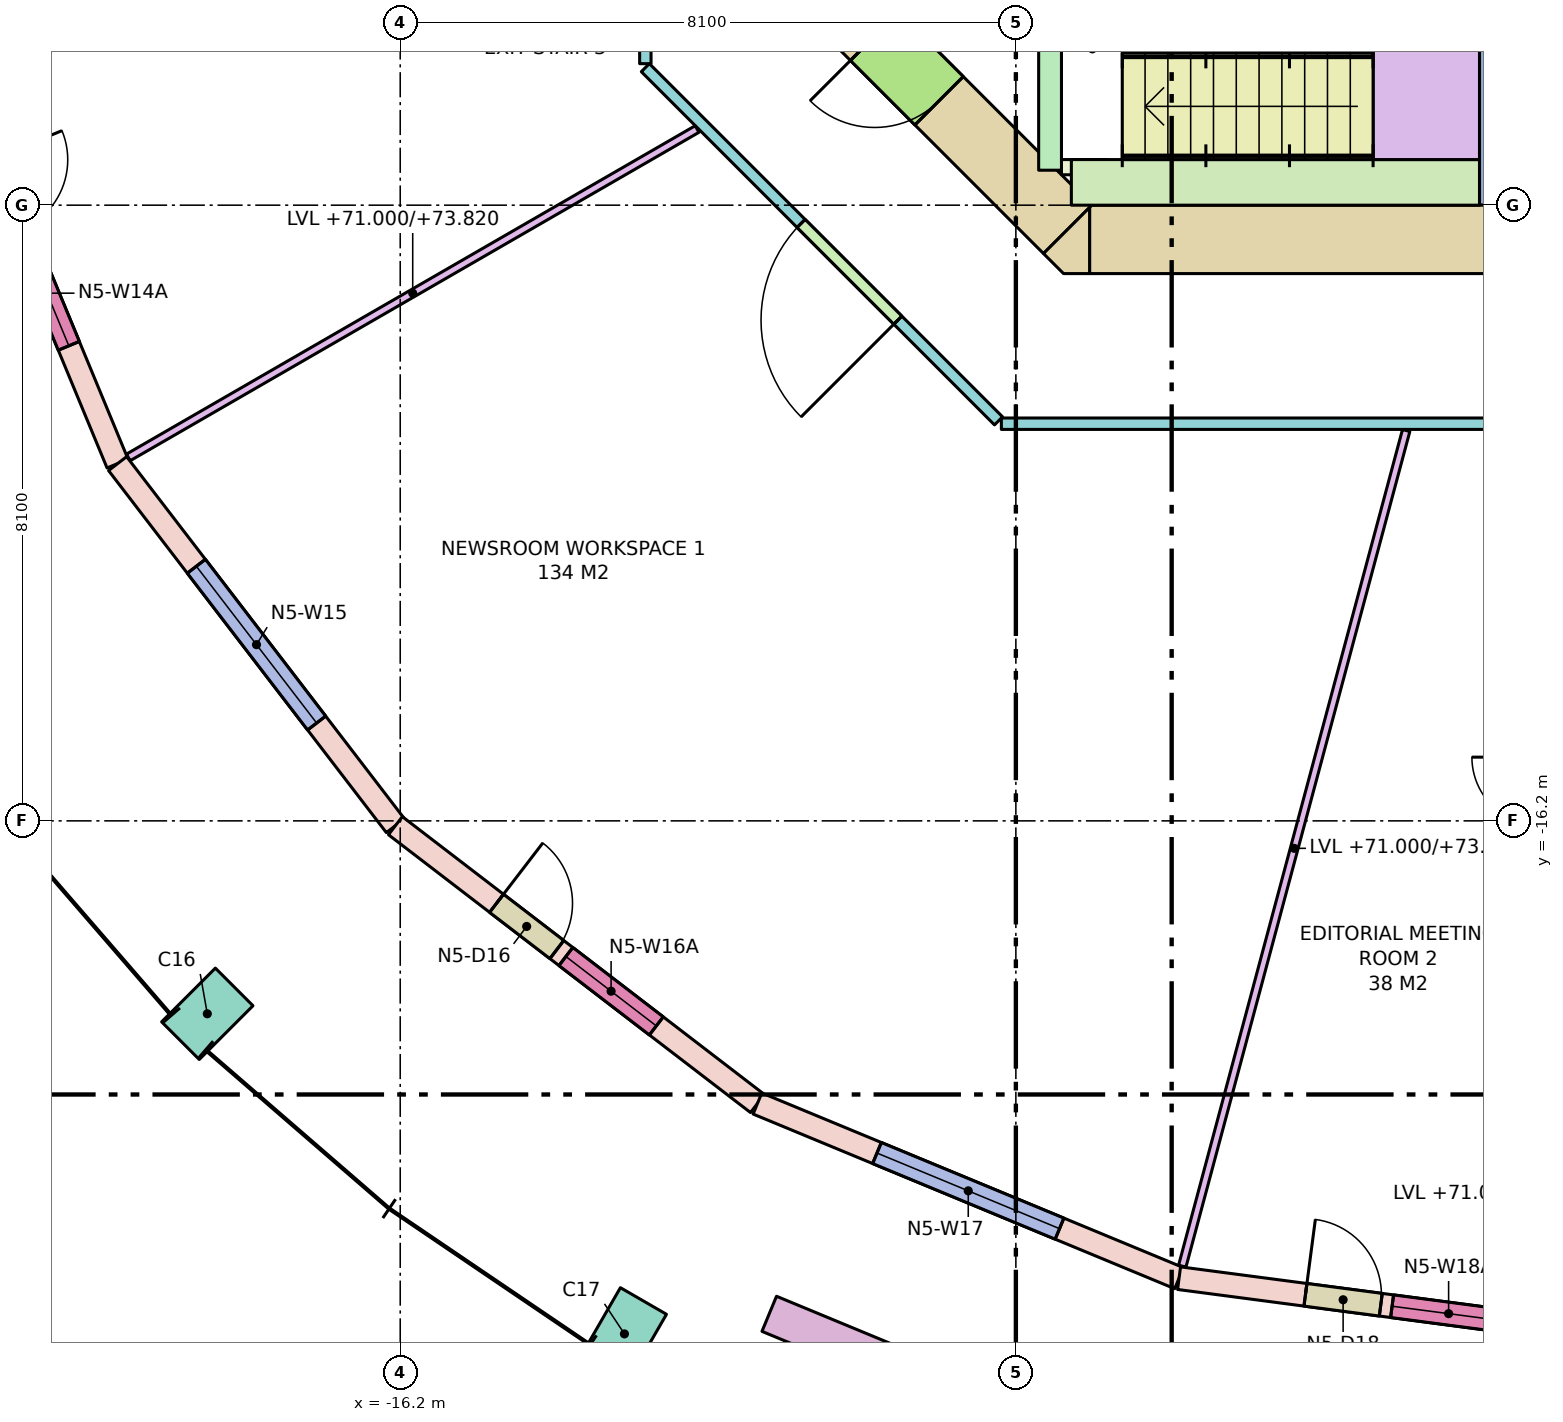
"""IFC4 building model, lengths in metres.
Left out: names, types, materials, properties, quantities, classifications, styles, units other than length and angle.
Written with IfcOpenShell. Run it as: python <this file> out.ifc"""

import sys

from ifc_helpers import new_model, si_unit, direction, frame, frame_2d, origin, origin_2d, place, context, subcontext, project, spatial, polyline, rectangle, outline, extrude, element, fill, save


model = new_model("IFC4")
c1 = context("Model", 3, precision=1e-05, world=origin(), true_north=direction((0.0, 1.0)))
c2 = subcontext(c1, "Body", "Model", "MODEL_VIEW")
j1 = project(units=[si_unit("LENGTHUNIT", "METRE"), si_unit("PLANEANGLEUNIT", "RADIAN")], contexts=[c1])
p1 = place(None, origin())
s1 = spatial("IfcSite", under=j1, at=p1, CompositionType="ELEMENT")
p2 = place(p1, origin())
s2 = spatial("IfcBuilding", under=s1, at=p2, CompositionType="ELEMENT")
p3 = place(p2, frame((0.0, 0.0, 71.0)))
s3 = spatial("IfcBuildingStorey", under=s2, at=p3, CompositionType="ELEMENT", Elevation=71.0)
for number, where, z_axis, x_axis in (
    (1, (-18.738, -18.738, 0.0), (0.0, 0.0, 1.0), (0.707, -0.707, 0.0)),
    (2, (-13.25, -22.95, 0.0), (0.0, 0.0, 1.0), (0.866, -0.5, 0.0)),
):
    element("IfcColumn", number, at=place(p3, frame(where, z_axis=z_axis, x_axis=x_axis)), inside=s3, PredefinedType="COLUMN", context=c2, shape_type="SweptSolid", body=[
        extrude(rectangle(XDim=0.7, YDim=1.0, at=origin_2d()), origin(), (0.0, 0.0, 1.0), 4.0),
    ])
p4 = place(p3, frame((-7.13, -8.55, -0.28), z_axis=(0.0, 0.0, 1.0), x_axis=(1.0, 0.0, 0.0)))
e3 = element("IfcWall", 3, at=p4, inside=s3, PredefinedType="SHEAR", context=c2, shape_type="SweptSolid", body=[
    extrude(rectangle(XDim=14.26, YDim=0.9, at=frame_2d((7.13, 0.0))), origin(), (0.0, 0.0, 1.0), 4.0),
])
p5 = place(p4, frame((8.08, 0.0, 0.28)))
e4 = element("IfcOpeningElement", 4, at=p5, cuts=e3, PredefinedType="OPENING", context=c2, shape_type="SweptSolid", body=[
    extrude(rectangle(XDim=0.7, YDim=2.1, at=frame_2d((0.35, 1.05))), frame((0.0, 0.46, 0.0), z_axis=(0.0, -1.0, 0.0), x_axis=(1.0, 0.0, 0.0)), (0.0, 0.0, 1.0), 0.92),
])
p6 = place(p4, frame((5.58, 0.0, 0.28)))
e5 = element("IfcOpeningElement", 5, at=p6, cuts=e3, PredefinedType="OPENING", context=c2, shape_type="SweptSolid", body=[
    extrude(rectangle(XDim=0.85, YDim=2.1, at=frame_2d((0.425, 1.05))), frame((0.0, 0.46, 0.0), z_axis=(0.0, -1.0, 0.0), x_axis=(1.0, 0.0, 0.0)), (0.0, 0.0, 1.0), 0.92),
])
p7 = place(p4, frame((6.88, 0.0, 0.28)))
e6 = element("IfcOpeningElement", 6, at=p7, cuts=e3, PredefinedType="OPENING", context=c2, shape_type="SweptSolid", body=[
    extrude(rectangle(XDim=0.85, YDim=2.1, at=frame_2d((0.425, 1.05))), frame((0.0, 0.46, 0.0), z_axis=(0.0, -1.0, 0.0), x_axis=(1.0, 0.0, 0.0)), (0.0, 0.0, 1.0), 0.92),
])
p8 = place(p4, frame((9.967, 0.0, 0.28)))
e7 = element("IfcOpeningElement", 7, at=p8, cuts=e3, PredefinedType="OPENING", context=c2, shape_type="SweptSolid", body=[
    extrude(rectangle(XDim=0.9, YDim=2.1, at=frame_2d((0.45, 1.05))), frame((0.0, 0.46, 0.0), z_axis=(0.0, -1.0, 0.0), x_axis=(1.0, 0.0, 0.0)), (0.0, 0.0, 1.0), 0.92),
])
p9 = place(p4, frame((12.567, 0.0, 0.28)))
e8 = element("IfcOpeningElement", 8, at=p9, cuts=e3, PredefinedType="OPENING", context=c2, shape_type="SweptSolid", body=[
    extrude(rectangle(XDim=0.9, YDim=2.1, at=frame_2d((0.45, 1.05))), frame((0.0, 0.46, 0.0), z_axis=(0.0, -1.0, 0.0), x_axis=(1.0, 0.0, 0.0)), (0.0, 0.0, 1.0), 0.92),
])
p10 = place(p3, frame((-7.418, -8.418, -0.28), z_axis=(0.0, 0.0, 1.0), x_axis=(-0.707106781187, 0.707106781187, 0.0)))
e9 = element("IfcWall", 9, at=p10, inside=s3, PredefinedType="SHEAR", context=c2, shape_type="SweptSolid", body=[
    extrude(rectangle(XDim=4.243, YDim=0.9, at=frame_2d((2.121, 0.0))), origin(), (0.0, 0.0, 1.0), 4.0),
])
p11 = place(p10, frame((2.393, 0.0, 0.28)))
e10 = element("IfcOpeningElement", 10, at=p11, cuts=e9, PredefinedType="OPENING", context=c2, shape_type="SweptSolid", body=[
    extrude(rectangle(XDim=1.2, YDim=2.1, at=frame_2d((0.6, 1.05))), frame((0.0, 0.46, 0.0), z_axis=(0.0, -1.0, 0.0), x_axis=(1.0, 0.0, 0.0)), (0.0, 0.0, 1.0), 0.92),
])
p12 = place(p3, frame((0.0, 0.0, -0.28)))
e11 = element("IfcWall", 11, at=p12, inside=s3, PredefinedType="SHEAR", context=c2, shape_type="SweptSolid", body=[
    extrude(outline(polyline([(-7.473, -9.0), (-7.736, -8.736), (-7.13, -8.13), (-7.13, -9.0), (-7.473, -9.0)])), origin(), (0.0, 0.0, 1.0), 4.0),
])
p13 = place(p3, frame((-1.85, -8.1, 0.0), z_axis=(0.0, 0.0, 1.0), x_axis=(0.0, 1.0, 0.0)))
e12 = element("IfcWall", 12, at=p13, inside=s3, PredefinedType="SHEAR", context=c2, shape_type="SweptSolid", body=[
    extrude(rectangle(XDim=6.6, YDim=0.3, at=frame_2d((3.3, 0.0))), origin(), (0.0, 0.0, 1.0), 3.72),
])
p14 = place(p3, frame((-7.65, -7.64, 0.0), z_axis=(0.0, 0.0, 1.0), x_axis=(0.0, 1.0, 0.0)))
e13 = element("IfcWall", 13, at=p14, inside=s3, PredefinedType="SHEAR", context=c2, shape_type="SweptSolid", body=[
    extrude(rectangle(XDim=3.14, YDim=0.3, at=frame_2d((1.57, 0.0))), origin(), (0.0, 0.0, 1.0), 3.72),
])
p15 = place(p14, frame((1.68, 0.0, 0.0)))
e14 = element("IfcOpeningElement", 14, at=p15, cuts=e13, PredefinedType="OPENING", context=c2, shape_type="SweptSolid", body=[
    extrude(rectangle(XDim=1.32, YDim=2.1, at=frame_2d((0.66, 1.05))), frame((0.0, 0.16, 0.0), z_axis=(0.0, -1.0, 0.0), x_axis=(1.0, 0.0, 0.0)), (0.0, 0.0, 1.0), 0.32),
])
p16 = place(p3, frame((-7.5, -7.6, 0.0), z_axis=(0.0, 0.0, 1.0), x_axis=(1.0, 0.0, 0.0)))
e15 = element("IfcWall", 15, at=p16, inside=s3, PredefinedType="SHEAR", context=c2, shape_type="SweptSolid", body=[
    extrude(rectangle(XDim=0.6, YDim=0.2, at=frame_2d((0.3, 0.0))), origin(), (0.0, 0.0, 1.0), 3.72),
])
p17 = place(p3, frame((-7.37, -7.8, 0.0), z_axis=(0.0, 0.0, 1.0), x_axis=(1.0, 0.0, 0.0)))
e16 = element("IfcWall", 16, at=p17, inside=s3, PredefinedType="SHEAR", context=c2, shape_type="SweptSolid", body=[
    extrude(rectangle(XDim=5.37, YDim=0.6, at=frame_2d((2.685, 0.0))), origin(), (0.0, 0.0, 1.0), 3.72),
])
p18 = place(p3, frame((-22.216, -5.953, 0.0), z_axis=(0.0, 0.0, 1.0), x_axis=(0.382671411433, -0.923884511653, 0.0)))
e17 = element("IfcWall", 17, at=p18, inside=s3, PredefinedType="STANDARD", context=c2, shape_type="SweptSolid", body=[
    extrude(rectangle(XDim=6.004, YDim=0.3, at=frame_2d((3.002, 0.0))), origin(), (0.0, 0.0, 1.0), 3.72),
])
p19 = place(p18, frame((1.677, 0.0, 0.0)))
e18 = element("IfcOpeningElement", 18, at=p19, cuts=e17, PredefinedType="OPENING", context=c2, shape_type="SweptSolid", body=[
    extrude(rectangle(XDim=1.0, YDim=2.4, at=frame_2d((0.5, 1.2))), frame((0.0, 0.16, 0.0), z_axis=(0.0, -1.0, 0.0), x_axis=(1.0, 0.0, 0.0)), (0.0, 0.0, 1.0), 0.32),
])
p20 = place(p18, frame((2.827, 0.0, 0.8)))
e19 = element("IfcOpeningElement", 19, at=p20, cuts=e17, PredefinedType="OPENING", context=c2, shape_type="SweptSolid", body=[
    extrude(rectangle(XDim=1.5, YDim=2.7, at=frame_2d((0.75, 1.35))), frame((0.0, 0.16, 0.0), z_axis=(0.0, -1.0, 0.0), x_axis=(1.0, 0.0, 0.0)), (0.0, 0.0, 1.0), 0.32),
])
p21 = place(p3, frame((-19.919, -11.5, 0.0), z_axis=(0.0, 0.0, 1.0), x_axis=(0.608778912074, -0.793339924758, 0.0)))
e20 = element("IfcWall", 20, at=p21, inside=s3, PredefinedType="STANDARD", context=c2, shape_type="SweptSolid", body=[
    extrude(rectangle(XDim=6.004, YDim=0.3, at=frame_2d((3.002, 0.0))), origin(), (0.0, 0.0, 1.0), 3.72),
])
p22 = place(p21, frame((1.702, 0.0, 0.8)))
e21 = element("IfcOpeningElement", 21, at=p22, cuts=e20, PredefinedType="OPENING", context=c2, shape_type="SweptSolid", body=[
    extrude(rectangle(XDim=2.6, YDim=2.7, at=frame_2d((1.3, 1.35))), frame((0.0, 0.16, 0.0), z_axis=(0.0, -1.0, 0.0), x_axis=(1.0, 0.0, 0.0)), (0.0, 0.0, 1.0), 0.32),
])
p23 = place(p3, frame((-16.263, -16.263, 0.0), z_axis=(0.0, 0.0, 1.0), x_axis=(0.793339924758, -0.608778912074, 0.0)))
e22 = element("IfcWall", 22, at=p23, inside=s3, PredefinedType="STANDARD", context=c2, shape_type="SweptSolid", body=[
    extrude(rectangle(XDim=6.004, YDim=0.3, at=frame_2d((3.002, 0.0))), origin(), (0.0, 0.0, 1.0), 3.72),
])
p24 = place(p23, frame((1.677, 0.0, 0.0)))
e23 = element("IfcOpeningElement", 23, at=p24, cuts=e22, PredefinedType="OPENING", context=c2, shape_type="SweptSolid", body=[
    extrude(rectangle(XDim=1.0, YDim=2.4, at=frame_2d((0.5, 1.2))), frame((0.0, 0.16, 0.0), z_axis=(0.0, -1.0, 0.0), x_axis=(1.0, 0.0, 0.0)), (0.0, 0.0, 1.0), 0.32),
])
p25 = place(p23, frame((2.827, 0.0, 0.8)))
e24 = element("IfcOpeningElement", 24, at=p25, cuts=e22, PredefinedType="OPENING", context=c2, shape_type="SweptSolid", body=[
    extrude(rectangle(XDim=1.5, YDim=2.7, at=frame_2d((0.75, 1.35))), frame((0.0, 0.16, 0.0), z_axis=(0.0, -1.0, 0.0), x_axis=(1.0, 0.0, 0.0)), (0.0, 0.0, 1.0), 0.32),
])
p26 = place(p3, frame((-11.5, -19.919, 0.0), z_axis=(0.0, 0.0, 1.0), x_axis=(0.923884511653, -0.382671411433, 0.0)))
e25 = element("IfcWall", 25, at=p26, inside=s3, PredefinedType="STANDARD", context=c2, shape_type="SweptSolid", body=[
    extrude(rectangle(XDim=6.004, YDim=0.3, at=frame_2d((3.002, 0.0))), origin(), (0.0, 0.0, 1.0), 3.72),
])
p27 = place(p26, frame((1.702, 0.0, 0.8)))
e26 = element("IfcOpeningElement", 26, at=p27, cuts=e25, PredefinedType="OPENING", context=c2, shape_type="SweptSolid", body=[
    extrude(rectangle(XDim=2.6, YDim=2.7, at=frame_2d((1.3, 1.35))), frame((0.0, 0.16, 0.0), z_axis=(0.0, -1.0, 0.0), x_axis=(1.0, 0.0, 0.0)), (0.0, 0.0, 1.0), 0.32),
])
p28 = place(p3, frame((-5.953, -22.216, 0.0), z_axis=(0.0, 0.0, 1.0), x_axis=(0.991445297315, -0.130522880875, 0.0)))
e27 = element("IfcWall", 27, at=p28, inside=s3, PredefinedType="STANDARD", context=c2, shape_type="SweptSolid", body=[
    extrude(rectangle(XDim=6.004, YDim=0.3, at=frame_2d((3.002, 0.0))), origin(), (0.0, 0.0, 1.0), 3.72),
])
p29 = place(p28, frame((1.677, 0.0, 0.0)))
e28 = element("IfcOpeningElement", 28, at=p29, cuts=e27, PredefinedType="OPENING", context=c2, shape_type="SweptSolid", body=[
    extrude(rectangle(XDim=1.0, YDim=2.4, at=frame_2d((0.5, 1.2))), frame((0.0, 0.16, 0.0), z_axis=(0.0, -1.0, 0.0), x_axis=(1.0, 0.0, 0.0)), (0.0, 0.0, 1.0), 0.32),
])
p30 = place(p28, frame((2.827, 0.0, 0.8)))
e29 = element("IfcOpeningElement", 29, at=p30, cuts=e27, PredefinedType="OPENING", context=c2, shape_type="SweptSolid", body=[
    extrude(rectangle(XDim=1.5, YDim=2.7, at=frame_2d((0.75, 1.35))), frame((0.0, 0.16, 0.0), z_axis=(0.0, -1.0, 0.0), x_axis=(1.0, 0.0, 0.0)), (0.0, 0.0, 1.0), 0.32),
])
p31 = place(p3, frame((-11.345, -22.685, 0.0), z_axis=(0.0, 0.0, 1.0), x_axis=(0.923885420167, -0.382669217998, 0.0)))
e30 = element("IfcWall", 30, at=p31, inside=s3, PredefinedType="PARAPET", context=c2, shape_type="SweptSolid", body=[
    extrude(rectangle(XDim=3.6, YDim=0.5, at=frame_2d((1.8, 0.0))), origin(), (0.0, 0.0, 1.0), 0.9),
])
p32 = place(p3, frame((-8.328, -10.938, 0.0), z_axis=(0.0, 0.0, 1.0), x_axis=(-0.707125355289, 0.707088206597, 0.0)))
e31 = element("IfcWall", 31, at=p32, inside=s3, PredefinedType="PARTITIONING", context=c2, shape_type="SweptSolid", body=[
    extrude(rectangle(XDim=6.572, YDim=0.15, at=frame_2d((3.286, 0.0))), origin(), (0.0, 0.0, 1.0), 2.82),
])
p33 = place(p32, frame((1.874, 0.0, 0.0)))
e32 = element("IfcOpeningElement", 32, at=p33, cuts=e31, PredefinedType="OPENING", context=c2, shape_type="SweptSolid", body=[
    extrude(rectangle(XDim=1.8, YDim=2.1, at=frame_2d((0.9, 1.05))), frame((0.0, 0.085, 0.0), z_axis=(0.0, -1.0, 0.0), x_axis=(1.0, 0.0, 0.0)), (0.0, 0.0, 1.0), 0.17),
])
p34 = place(p3, frame((-12.975, -6.238, 0.0), z_axis=(0.0, 0.0, 1.0), x_axis=(0.0, 1.0, 0.0)))
e33 = element("IfcWall", 33, at=p34, inside=s3, PredefinedType="PARTITIONING", context=c2, shape_type="SweptSolid", body=[
    extrude(rectangle(XDim=4.963, YDim=0.15, at=frame_2d((2.482, 0.0))), origin(), (0.0, 0.0, 1.0), 2.82),
])
p35 = place(p3, frame((-1.275, -10.975, 0.0), z_axis=(0.0, 0.0, 1.0), x_axis=(-1.0, 0.0, 0.0)))
e34 = element("IfcWall", 34, at=p35, inside=s3, PredefinedType="PARTITIONING", context=c2, shape_type="SweptSolid", body=[
    extrude(rectangle(XDim=7.016, YDim=0.15, at=frame_2d((3.508, 0.0))), origin(), (0.0, 0.0, 1.0), 2.82),
])
p36 = place(p3, frame((-12.294, -7.098, 0.0), z_axis=(0.0, 0.0, 1.0), x_axis=(-0.866010547425, -0.500025731086, 0.0)))
e35 = element("IfcWall", 35, at=p36, inside=s3, PredefinedType="PARTITIONING", context=c2, shape_type="SweptSolid", body=[
    extrude(rectangle(XDim=8.641, YDim=0.1, at=frame_2d((4.32, 0.0))), origin(), (0.0, 0.0, 1.0), 2.82),
])
p37 = place(p3, frame((-2.965, -11.064, 0.0), z_axis=(0.0, 0.0, 1.0), x_axis=(-0.258827930947, -0.965923445291, 0.0)))
e36 = element("IfcWall", 36, at=p37, inside=s3, PredefinedType="PARTITIONING", context=c2, shape_type="SweptSolid", body=[
    extrude(rectangle(XDim=11.382, YDim=0.1, at=frame_2d((5.691, 0.0))), origin(), (0.0, 0.0, 1.0), 2.82),
])
p38 = place(p20, origin())
e37 = element("IfcWindow", 37, at=p38, inside=s3, PartitioningType="SINGLE_PANEL", PredefinedType="WINDOW", context=c2, shape_type="SweptSolid", body=[
    extrude(rectangle(XDim=1.5, YDim=2.7, at=frame_2d((0.75, 1.35))), frame((0.0, 0.03, 0.0), z_axis=(0.0, -1.0, 0.0), x_axis=(1.0, 0.0, 0.0)), (0.0, 0.0, 1.0), 0.06),
])
fill(e19, e37)
p39 = place(p22, origin())
e38 = element("IfcWindow", 38, at=p39, inside=s3, PartitioningType="SINGLE_PANEL", PredefinedType="WINDOW", context=c2, shape_type="SweptSolid", body=[
    extrude(rectangle(XDim=2.6, YDim=2.7, at=frame_2d((1.3, 1.35))), frame((0.0, 0.03, 0.0), z_axis=(0.0, -1.0, 0.0), x_axis=(1.0, 0.0, 0.0)), (0.0, 0.0, 1.0), 0.06),
])
fill(e21, e38)
p40 = place(p24, origin())
e39 = element("IfcDoor", 39, at=p40, inside=s3, OperationType="SINGLE_SWING_LEFT", PredefinedType="DOOR", context=c2, shape_type="SweptSolid", body=[
    extrude(rectangle(XDim=1.0, YDim=2.4, at=frame_2d((0.5, 1.2))), frame((0.0, 0.025, 0.0), z_axis=(0.0, -1.0, 0.0), x_axis=(1.0, 0.0, 0.0)), (0.0, 0.0, 1.0), 0.05),
])
fill(e23, e39)
p41 = place(p25, origin())
e40 = element("IfcWindow", 40, at=p41, inside=s3, PartitioningType="SINGLE_PANEL", PredefinedType="WINDOW", context=c2, shape_type="SweptSolid", body=[
    extrude(rectangle(XDim=1.5, YDim=2.7, at=frame_2d((0.75, 1.35))), frame((0.0, 0.03, 0.0), z_axis=(0.0, -1.0, 0.0), x_axis=(1.0, 0.0, 0.0)), (0.0, 0.0, 1.0), 0.06),
])
fill(e24, e40)
p42 = place(p27, origin())
e41 = element("IfcWindow", 41, at=p42, inside=s3, PartitioningType="SINGLE_PANEL", PredefinedType="WINDOW", context=c2, shape_type="SweptSolid", body=[
    extrude(rectangle(XDim=2.6, YDim=2.7, at=frame_2d((1.3, 1.35))), frame((0.0, 0.03, 0.0), z_axis=(0.0, -1.0, 0.0), x_axis=(1.0, 0.0, 0.0)), (0.0, 0.0, 1.0), 0.06),
])
fill(e26, e41)
p43 = place(p29, origin())
e42 = element("IfcDoor", 42, at=p43, inside=s3, OperationType="SINGLE_SWING_LEFT", PredefinedType="DOOR", context=c2, shape_type="SweptSolid", body=[
    extrude(rectangle(XDim=1.0, YDim=2.4, at=frame_2d((0.5, 1.2))), frame((0.0, 0.025, 0.0), z_axis=(0.0, -1.0, 0.0), x_axis=(1.0, 0.0, 0.0)), (0.0, 0.0, 1.0), 0.05),
])
fill(e28, e42)
p44 = place(p30, origin())
e43 = element("IfcWindow", 43, at=p44, inside=s3, PartitioningType="SINGLE_PANEL", PredefinedType="WINDOW", context=c2, shape_type="SweptSolid", body=[
    extrude(rectangle(XDim=1.5, YDim=2.7, at=frame_2d((0.75, 1.35))), frame((0.0, 0.03, 0.0), z_axis=(0.0, -1.0, 0.0), x_axis=(1.0, 0.0, 0.0)), (0.0, 0.0, 1.0), 0.06),
])
fill(e29, e43)
p45 = place(p11, origin())
e44 = element("IfcDoor", 44, at=p45, inside=s3, OperationType="SINGLE_SWING_RIGHT", PredefinedType="DOOR", context=c2, shape_type="SweptSolid", body=[
    extrude(rectangle(XDim=1.2, YDim=2.1, at=frame_2d((0.6, 1.05))), frame((0.0, 0.025, 0.0), z_axis=(0.0, -1.0, 0.0), x_axis=(1.0, 0.0, 0.0)), (0.0, 0.0, 1.0), 0.05),
])
fill(e10, e44)
p46 = place(p33, origin())
e45 = element("IfcDoor", 45, at=p46, inside=s3, OperationType="DOUBLE_DOOR_SINGLE_SWING", PredefinedType="DOOR", context=c2, shape_type="SweptSolid", body=[
    extrude(rectangle(XDim=1.8, YDim=2.1, at=frame_2d((0.9, 1.05))), frame((0.0, 0.025, 0.0), z_axis=(0.0, -1.0, 0.0), x_axis=(1.0, 0.0, 0.0)), (0.0, 0.0, 1.0), 0.05),
])
fill(e32, e45)
save(model, sys.argv[1])
